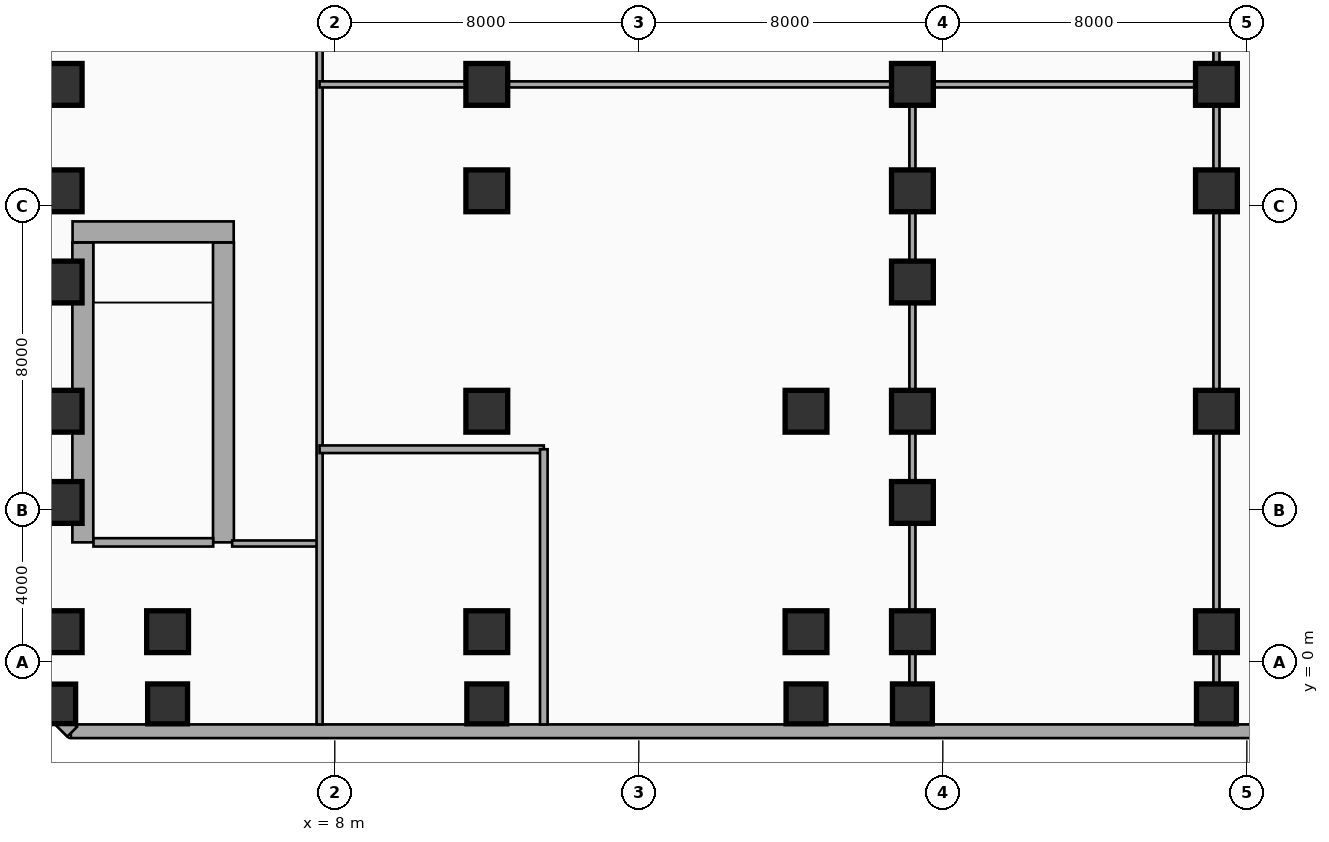
"""IFC4 building model, lengths in metres.
Left out: names, types, materials, properties, quantities, classifications, styles, units other than length and angle.
Written with IfcOpenShell. Run it as: python <this file> out.ifc"""

import sys

from ifc_helpers import new_model, si_unit, direction, frame, frame_2d, origin, origin_2d, place, context, subcontext, project, spatial, rectangle, extrude, element, fill, save


model = new_model("IFC4")
c1 = context("Model", 3, precision=1e-05, world=origin(), true_north=direction((0.0, 1.0)))
c2 = subcontext(c1, "Body", "Model", "MODEL_VIEW")
j1 = project(units=[si_unit("LENGTHUNIT", "METRE"), si_unit("PLANEANGLEUNIT", "RADIAN")], contexts=[c1])
p1 = place(None, origin())
s1 = spatial("IfcSite", under=j1, at=p1, CompositionType="ELEMENT")
p2 = place(p1, origin())
s2 = spatial("IfcBuilding", under=s1, at=p2, CompositionType="ELEMENT")
p3 = place(p2, origin())
s3 = spatial("IfcBuildingStorey", under=s2, at=p3, CompositionType="ELEMENT", Elevation=0.0)
for number, where, z_axis, x_axis in (
    (1, (1.37, 3.15, 0.0), (0.0, 0.0, 1.0), (0.0, 1.0, 0.0)),
    (2, (5.07, 3.15, 0.0), (0.0, 0.0, 1.0), (0.0, 1.0, 0.0)),
):
    element("IfcWall", number, at=place(p3, frame(where, z_axis=z_axis, x_axis=x_axis)), inside=s3, PredefinedType="SHEAR", context=c2, shape_type="SweptSolid", body=[
        extrude(rectangle(XDim=7.89, YDim=0.55, at=frame_2d((3.945, 0.0))), origin(), (0.0, 0.0, 1.0), 5.94),
    ])
p4 = place(p3, frame((1.1, 11.32, 0.0), z_axis=(0.0, 0.0, 1.0), x_axis=(1.0, 0.0, 0.0)))
e3 = element("IfcWall", 3, at=p4, inside=s3, PredefinedType="SHEAR", context=c2, shape_type="SweptSolid", body=[
    extrude(rectangle(XDim=4.24, YDim=0.55, at=frame_2d((2.12, 0.0))), origin(), (0.0, 0.0, 1.0), 5.94),
])
p5 = place(p3, frame((0.8, -1.1, 0.0), z_axis=(0.0, 0.0, 1.0), x_axis=(1.0, 0.0, 0.0)))
e4 = element("IfcColumn", 4, at=p5, inside=s3, PredefinedType="PILASTER", context=c2, shape_type="SweptSolid", body=[
    extrude(rectangle(XDim=0.76, YDim=1.04, at=origin_2d()), origin(), (0.0, 0.0, 1.0), 5.94),
])
for number, where, z_axis, x_axis in (
    (5, (0.8, 0.8, 0.0), (0.0, 0.0, 1.0), (1.0, 0.0, 0.0)),
    (6, (0.8, 4.2, 0.0), (0.0, 0.0, 1.0), (1.0, 0.0, 0.0)),
    (7, (0.8, 6.6, 0.0), (0.0, 0.0, 1.0), (1.0, 0.0, 0.0)),
    (8, (0.8, 10.0, 0.0), (0.0, 0.0, 1.0), (1.0, 0.0, 0.0)),
    (9, (0.8, 12.4, 0.0), (0.0, 0.0, 1.0), (1.0, 0.0, 0.0)),
    (10, (0.8, 15.2, 0.0), (0.0, 0.0, 1.0), (1.0, 0.0, 0.0)),
):
    element("IfcColumn", number, at=place(p3, frame(where, z_axis=z_axis, x_axis=x_axis)), inside=s3, PredefinedType="COLUMN", context=c2, shape_type="SweptSolid", body=[
        extrude(rectangle(XDim=1.1, YDim=1.1, at=origin_2d()), origin(), (0.0, 0.0, 1.0), 5.94),
    ])
p6 = place(p3, frame((3.6, -1.1, 0.0), z_axis=(0.0, 0.0, 1.0), x_axis=(1.0, 0.0, 0.0)))
e11 = element("IfcColumn", 11, at=p6, inside=s3, PredefinedType="COLUMN", context=c2, shape_type="SweptSolid", body=[
    extrude(rectangle(XDim=1.05, YDim=1.05, at=origin_2d()), origin(), (0.0, 0.0, 1.0), 5.94),
])
p7 = place(p3, frame((3.6, 0.8, 0.0), z_axis=(0.0, 0.0, 1.0), x_axis=(1.0, 0.0, 0.0)))
e12 = element("IfcColumn", 12, at=p7, inside=s3, PredefinedType="COLUMN", context=c2, shape_type="SweptSolid", body=[
    extrude(rectangle(XDim=1.1, YDim=1.1, at=origin_2d()), origin(), (0.0, 0.0, 1.0), 5.94),
])
p8 = place(p3, frame((12.0, -1.1, 0.0), z_axis=(0.0, 0.0, 1.0), x_axis=(1.0, 0.0, 0.0)))
e13 = element("IfcColumn", 13, at=p8, inside=s3, PredefinedType="COLUMN", context=c2, shape_type="SweptSolid", body=[
    extrude(rectangle(XDim=1.05, YDim=1.05, at=origin_2d()), origin(), (0.0, 0.0, 1.0), 5.94),
])
for number, where, z_axis, x_axis in (
    (14, (12.0, 0.8, 0.0), (0.0, 0.0, 1.0), (1.0, 0.0, 0.0)),
    (15, (12.0, 6.6, 0.0), (0.0, 0.0, 1.0), (1.0, 0.0, 0.0)),
    (16, (12.0, 12.4, 0.0), (0.0, 0.0, 1.0), (1.0, 0.0, 0.0)),
    (17, (12.0, 15.2, 0.0), (0.0, 0.0, 1.0), (1.0, 0.0, 0.0)),
):
    element("IfcColumn", number, at=place(p3, frame(where, z_axis=z_axis, x_axis=x_axis)), inside=s3, PredefinedType="COLUMN", context=c2, shape_type="SweptSolid", body=[
        extrude(rectangle(XDim=1.1, YDim=1.1, at=origin_2d()), origin(), (0.0, 0.0, 1.0), 5.94),
    ])
p9 = place(p3, frame((20.4, -1.1, 0.0), z_axis=(0.0, 0.0, 1.0), x_axis=(1.0, 0.0, 0.0)))
e18 = element("IfcColumn", 18, at=p9, inside=s3, PredefinedType="COLUMN", context=c2, shape_type="SweptSolid", body=[
    extrude(rectangle(XDim=1.05, YDim=1.05, at=origin_2d()), origin(), (0.0, 0.0, 1.0), 5.94),
])
for number, where, z_axis, x_axis in (
    (19, (20.4, 0.8, 0.0), (0.0, 0.0, 1.0), (1.0, 0.0, 0.0)),
    (20, (20.4, 6.6, 0.0), (0.0, 0.0, 1.0), (1.0, 0.0, 0.0)),
):
    element("IfcColumn", number, at=place(p3, frame(where, z_axis=z_axis, x_axis=x_axis)), inside=s3, PredefinedType="COLUMN", context=c2, shape_type="SweptSolid", body=[
        extrude(rectangle(XDim=1.1, YDim=1.1, at=origin_2d()), origin(), (0.0, 0.0, 1.0), 5.94),
    ])
p10 = place(p3, frame((23.2, -1.1, 0.0), z_axis=(0.0, 0.0, 1.0), x_axis=(1.0, 0.0, 0.0)))
e21 = element("IfcColumn", 21, at=p10, inside=s3, PredefinedType="COLUMN", context=c2, shape_type="SweptSolid", body=[
    extrude(rectangle(XDim=1.05, YDim=1.05, at=origin_2d()), origin(), (0.0, 0.0, 1.0), 5.94),
])
for number, where, z_axis, x_axis in (
    (22, (23.2, 0.8, 0.0), (0.0, 0.0, 1.0), (1.0, 0.0, 0.0)),
    (23, (23.2, 4.2, 0.0), (0.0, 0.0, 1.0), (1.0, 0.0, 0.0)),
    (24, (23.2, 6.6, 0.0), (0.0, 0.0, 1.0), (1.0, 0.0, 0.0)),
    (25, (23.2, 10.0, 0.0), (0.0, 0.0, 1.0), (1.0, 0.0, 0.0)),
    (26, (23.2, 12.4, 0.0), (0.0, 0.0, 1.0), (1.0, 0.0, 0.0)),
    (27, (23.2, 15.2, 0.0), (0.0, 0.0, 1.0), (1.0, 0.0, 0.0)),
):
    element("IfcColumn", number, at=place(p3, frame(where, z_axis=z_axis, x_axis=x_axis)), inside=s3, PredefinedType="COLUMN", context=c2, shape_type="SweptSolid", body=[
        extrude(rectangle(XDim=1.1, YDim=1.1, at=origin_2d()), origin(), (0.0, 0.0, 1.0), 5.94),
    ])
p11 = place(p3, frame((31.2, -1.1, 0.0), z_axis=(0.0, 0.0, 1.0), x_axis=(1.0, 0.0, 0.0)))
e28 = element("IfcColumn", 28, at=p11, inside=s3, PredefinedType="COLUMN", context=c2, shape_type="SweptSolid", body=[
    extrude(rectangle(XDim=1.05, YDim=1.05, at=origin_2d()), origin(), (0.0, 0.0, 1.0), 5.94),
])
for number, where, z_axis, x_axis in (
    (29, (31.2, 0.8, 0.0), (0.0, 0.0, 1.0), (1.0, 0.0, 0.0)),
    (30, (31.2, 6.6, 0.0), (0.0, 0.0, 1.0), (1.0, 0.0, 0.0)),
    (31, (31.2, 12.4, 0.0), (0.0, 0.0, 1.0), (1.0, 0.0, 0.0)),
    (32, (31.2, 15.2, 0.0), (0.0, 0.0, 1.0), (1.0, 0.0, 0.0)),
):
    element("IfcColumn", number, at=place(p3, frame(where, z_axis=z_axis, x_axis=x_axis)), inside=s3, PredefinedType="COLUMN", context=c2, shape_type="SweptSolid", body=[
        extrude(rectangle(XDim=1.1, YDim=1.1, at=origin_2d()), origin(), (0.0, 0.0, 1.0), 5.94),
    ])
p12 = place(p3, frame((1.055, -1.82, 0.0), z_axis=(0.0, 0.0, 1.0), x_axis=(1.0, 0.0, 0.0)))
e33 = element("IfcWall", 33, at=p12, inside=s3, PredefinedType="SOLIDWALL", context=c2, shape_type="SweptSolid", body=[
    extrude(rectangle(XDim=31.89, YDim=0.36, at=frame_2d((15.945, 0.0))), origin(), (0.0, 0.0, 1.0), 5.62),
])
p13 = place(p12, frame((5.6, 0.0, 0.0), z_axis=(0.0, 0.0, 1.0), x_axis=(-1.0, 0.0, 0.0)))
e34 = element("IfcOpeningElement", 34, at=p13, cuts=e33, PredefinedType="OPENING", context=c2, shape_type="SweptSolid", body=[
    extrude(rectangle(XDim=1.8, YDim=2.2, at=frame_2d((0.9, 1.1))), frame((0.0, 0.19, 0.0), z_axis=(0.0, -1.0, 0.0), x_axis=(1.0, 0.0, 0.0)), (0.0, 0.0, 1.0), 0.38),
])
p14 = place(p12, frame((7.9, 0.0, 0.0), z_axis=(0.0, 0.0, 1.0), x_axis=(-1.0, 0.0, 0.0)))
e35 = element("IfcOpeningElement", 35, at=p14, cuts=e33, PredefinedType="OPENING", context=c2, shape_type="SweptSolid", body=[
    extrude(rectangle(XDim=1.1, YDim=2.2, at=frame_2d((0.55, 1.1))), frame((0.0, 0.19, 0.0), z_axis=(0.0, -1.0, 0.0), x_axis=(1.0, 0.0, 0.0)), (0.0, 0.0, 1.0), 0.38),
])
p15 = place(p12, frame((16.8, 0.0, 0.0), z_axis=(0.0, 0.0, 1.0), x_axis=(-1.0, 0.0, 0.0)))
e36 = element("IfcOpeningElement", 36, at=p15, cuts=e33, PredefinedType="OPENING", context=c2, shape_type="SweptSolid", body=[
    extrude(rectangle(XDim=1.8, YDim=2.4, at=frame_2d((0.9, 1.2))), frame((0.0, 0.19, 0.0), z_axis=(0.0, -1.0, 0.0), x_axis=(1.0, 0.0, 0.0)), (0.0, 0.0, 1.0), 0.38),
])
p16 = place(p12, frame((25.8, 0.0, 0.0), z_axis=(0.0, 0.0, 1.0), x_axis=(-1.0, 0.0, 0.0)))
e37 = element("IfcOpeningElement", 37, at=p16, cuts=e33, PredefinedType="OPENING", context=c2, shape_type="SweptSolid", body=[
    extrude(rectangle(XDim=1.8, YDim=2.4, at=frame_2d((0.9, 1.2))), frame((0.0, 0.19, 0.0), z_axis=(0.0, -1.0, 0.0), x_axis=(1.0, 0.0, 0.0)), (0.0, 0.0, 1.0), 0.38),
])
p17 = place(p3, frame((-1.834, 1.088, 0.0), z_axis=(0.0, 0.0, 1.0), x_axis=(0.707106781187, -0.707106781187, 0.0)))
e38 = element("IfcWall", 38, at=p17, inside=s3, PredefinedType="SOLIDWALL", context=c2, shape_type="SweptSolid", body=[
    extrude(rectangle(XDim=4.133, YDim=0.36, at=frame_2d((2.066, 0.0))), origin(), (0.0, 0.0, 1.0), 5.62),
])
p18 = place(p3, frame((1.65, 3.15, 0.0), z_axis=(0.0, 0.0, 1.0), x_axis=(1.0, 0.0, 0.0)))
e39 = element("IfcWall", 39, at=p18, inside=s3, PredefinedType="PARTITIONING", context=c2, shape_type="SweptSolid", body=[
    extrude(rectangle(XDim=3.15, YDim=0.22, at=frame_2d((1.575, 0.0))), origin(), (0.0, 0.0, 1.0), 5.62),
])
p19 = place(p18, frame((2.1, 0.0, 0.0), z_axis=(0.0, 0.0, 1.0), x_axis=(-1.0, 0.0, 0.0)))
e40 = element("IfcOpeningElement", 40, at=p19, cuts=e39, PredefinedType="OPENING", context=c2, shape_type="SweptSolid", body=[
    extrude(rectangle(XDim=1.05, YDim=2.15, at=frame_2d((0.525, 1.075))), frame((0.0, 0.12, 0.0), z_axis=(0.0, -1.0, 0.0), x_axis=(1.0, 0.0, 0.0)), (0.0, 0.0, 1.0), 0.24),
])
p20 = place(p3, frame((5.3, 3.12, 0.0), z_axis=(0.0, 0.0, 1.0), x_axis=(1.0, 0.0, 0.0)))
e41 = element("IfcWall", 41, at=p20, inside=s3, PredefinedType="PARTITIONING", context=c2, shape_type="SweptSolid", body=[
    extrude(rectangle(XDim=2.3, YDim=0.16, at=frame_2d((1.15, 0.0))), origin(), (0.0, 0.0, 1.0), 5.62),
])
p21 = place(p20, frame((0.6, 0.0, 0.0)))
e42 = element("IfcOpeningElement", 42, at=p21, cuts=e41, PredefinedType="OPENING", context=c2, shape_type="SweptSolid", body=[
    extrude(rectangle(XDim=1.1, YDim=2.15, at=frame_2d((0.55, 1.075))), frame((0.0, 0.09, 0.0), z_axis=(0.0, -1.0, 0.0), x_axis=(1.0, 0.0, 0.0)), (0.0, 0.0, 1.0), 0.18),
])
p22 = place(p3, frame((7.6, -1.64, 0.0), z_axis=(0.0, 0.0, 1.0), x_axis=(0.0, 1.0, 0.0)))
e43 = element("IfcWall", 43, at=p22, inside=s3, PredefinedType="PARTITIONING", context=c2, shape_type="SweptSolid", body=[
    extrude(rectangle(XDim=31.04, YDim=0.16, at=frame_2d((15.52, 0.0))), origin(), (0.0, 0.0, 1.0), 5.62),
])
p23 = place(p22, frame((1.8, 0.0, 0.0)))
e44 = element("IfcOpeningElement", 44, at=p23, cuts=e43, PredefinedType="OPENING", context=c2, shape_type="SweptSolid", body=[
    extrude(rectangle(XDim=1.1, YDim=2.15, at=frame_2d((0.55, 1.075))), frame((0.0, 0.09, 0.0), z_axis=(0.0, -1.0, 0.0), x_axis=(1.0, 0.0, 0.0)), (0.0, 0.0, 1.0), 0.18),
])
p24 = place(p3, frame((7.6, 5.6, 0.0), z_axis=(0.0, 0.0, 1.0), x_axis=(1.0, 0.0, 0.0)))
e45 = element("IfcWall", 45, at=p24, inside=s3, PredefinedType="PARTITIONING", context=c2, shape_type="SweptSolid", body=[
    extrude(rectangle(XDim=5.9, YDim=0.2, at=frame_2d((2.95, 0.0))), origin(), (0.0, 0.0, 1.0), 5.62),
])
p25 = place(p3, frame((13.5, -1.64, 0.0), z_axis=(0.0, 0.0, 1.0), x_axis=(0.0, 1.0, 0.0)))
e46 = element("IfcWall", 46, at=p25, inside=s3, PredefinedType="PARTITIONING", context=c2, shape_type="SweptSolid", body=[
    extrude(rectangle(XDim=7.24, YDim=0.2, at=frame_2d((3.62, 0.0))), origin(), (0.0, 0.0, 1.0), 5.62),
])
p26 = place(p3, frame((7.6, 15.2, 0.0), z_axis=(0.0, 0.0, 1.0), x_axis=(1.0, 0.0, 0.0)))
e47 = element("IfcWall", 47, at=p26, inside=s3, PredefinedType="PARTITIONING", context=c2, shape_type="SweptSolid", body=[
    extrude(rectangle(XDim=23.6, YDim=0.16, at=frame_2d((11.8, 0.0))), origin(), (0.0, 0.0, 1.0), 4.805),
])
p27 = place(p26, frame((6.0, 0.0, 0.0)))
e48 = element("IfcOpeningElement", 48, at=p27, cuts=e47, PredefinedType="OPENING", context=c2, shape_type="SweptSolid", body=[
    extrude(rectangle(XDim=0.95, YDim=2.15, at=frame_2d((0.475, 1.075))), frame((0.0, 0.09, 0.0), z_axis=(0.0, -1.0, 0.0), x_axis=(1.0, 0.0, 0.0)), (0.0, 0.0, 1.0), 0.18),
])
p28 = place(p26, frame((18.5, 0.0, 0.0)))
e49 = element("IfcOpeningElement", 49, at=p28, cuts=e47, PredefinedType="OPENING", context=c2, shape_type="SweptSolid", body=[
    extrude(rectangle(XDim=1.8, YDim=2.3, at=frame_2d((0.9, 1.15))), frame((0.0, 0.09, 0.0), z_axis=(0.0, -1.0, 0.0), x_axis=(1.0, 0.0, 0.0)), (0.0, 0.0, 1.0), 0.18),
])
p29 = place(p3, frame((23.2, -1.64, 0.0), z_axis=(0.0, 0.0, 1.0), x_axis=(0.0, 1.0, 0.0)))
e50 = element("IfcWall", 50, at=p29, inside=s3, PredefinedType="PARTITIONING", context=c2, shape_type="SweptSolid", body=[
    extrude(rectangle(XDim=16.84, YDim=0.16, at=frame_2d((8.42, 0.0))), origin(), (0.0, 0.0, 1.0), 4.955),
])
p30 = place(p3, frame((31.2, -1.64, 0.0), z_axis=(0.0, 0.0, 1.0), x_axis=(0.0, 1.0, 0.0)))
e51 = element("IfcWall", 51, at=p30, inside=s3, PredefinedType="PARTITIONING", context=c2, shape_type="SweptSolid", body=[
    extrude(rectangle(XDim=31.04, YDim=0.16, at=frame_2d((15.52, 0.0))), origin(), (0.0, 0.0, 1.0), 4.805),
])
p31 = place(p13, origin())
e52 = element("IfcDoor", 52, at=p31, inside=s3, OperationType="DOUBLE_DOOR_SINGLE_SWING", PredefinedType="DOOR", context=c2, shape_type="SweptSolid", body=[
    extrude(rectangle(XDim=1.8, YDim=2.2, at=frame_2d((0.9, 1.1))), frame((0.0, 0.025, 0.0), z_axis=(0.0, -1.0, 0.0), x_axis=(1.0, 0.0, 0.0)), (0.0, 0.0, 1.0), 0.05),
])
fill(e34, e52)
p32 = place(p14, origin())
e53 = element("IfcDoor", 53, at=p32, inside=s3, OperationType="SINGLE_SWING_LEFT", PredefinedType="DOOR", context=c2, shape_type="SweptSolid", body=[
    extrude(rectangle(XDim=1.1, YDim=2.2, at=frame_2d((0.55, 1.1))), frame((0.0, 0.025, 0.0), z_axis=(0.0, -1.0, 0.0), x_axis=(1.0, 0.0, 0.0)), (0.0, 0.0, 1.0), 0.05),
])
fill(e35, e53)
p33 = place(p15, origin())
e54 = element("IfcDoor", 54, at=p33, inside=s3, OperationType="DOUBLE_DOOR_SINGLE_SWING", PredefinedType="DOOR", context=c2, shape_type="SweptSolid", body=[
    extrude(rectangle(XDim=1.8, YDim=2.4, at=frame_2d((0.9, 1.2))), frame((0.0, 0.025, 0.0), z_axis=(0.0, -1.0, 0.0), x_axis=(1.0, 0.0, 0.0)), (0.0, 0.0, 1.0), 0.05),
])
fill(e36, e54)
p34 = place(p16, origin())
e55 = element("IfcDoor", 55, at=p34, inside=s3, OperationType="DOUBLE_DOOR_SINGLE_SWING", PredefinedType="DOOR", context=c2, shape_type="SweptSolid", body=[
    extrude(rectangle(XDim=1.8, YDim=2.4, at=frame_2d((0.9, 1.2))), frame((0.0, 0.025, 0.0), z_axis=(0.0, -1.0, 0.0), x_axis=(1.0, 0.0, 0.0)), (0.0, 0.0, 1.0), 0.05),
])
fill(e37, e55)
p35 = place(p19, origin())
e56 = element("IfcDoor", 56, at=p35, inside=s3, OperationType="SINGLE_SWING_LEFT", PredefinedType="DOOR", context=c2, shape_type="SweptSolid", body=[
    extrude(rectangle(XDim=1.05, YDim=2.15, at=frame_2d((0.525, 1.075))), frame((0.0, 0.025, 0.0), z_axis=(0.0, -1.0, 0.0), x_axis=(1.0, 0.0, 0.0)), (0.0, 0.0, 1.0), 0.05),
])
fill(e40, e56)
p36 = place(p21, origin())
e57 = element("IfcDoor", 57, at=p36, inside=s3, OperationType="SINGLE_SWING_LEFT", PredefinedType="DOOR", context=c2, shape_type="SweptSolid", body=[
    extrude(rectangle(XDim=1.1, YDim=2.15, at=frame_2d((0.55, 1.075))), frame((0.0, 0.025, 0.0), z_axis=(0.0, -1.0, 0.0), x_axis=(1.0, 0.0, 0.0)), (0.0, 0.0, 1.0), 0.05),
])
fill(e42, e57)
p37 = place(p23, origin())
e58 = element("IfcDoor", 58, at=p37, inside=s3, OperationType="SINGLE_SWING_RIGHT", PredefinedType="DOOR", context=c2, shape_type="SweptSolid", body=[
    extrude(rectangle(XDim=1.1, YDim=2.15, at=frame_2d((0.55, 1.075))), frame((0.0, 0.025, 0.0), z_axis=(0.0, -1.0, 0.0), x_axis=(1.0, 0.0, 0.0)), (0.0, 0.0, 1.0), 0.05),
])
fill(e44, e58)
p38 = place(p27, origin())
e59 = element("IfcDoor", 59, at=p38, inside=s3, OperationType="SINGLE_SWING_LEFT", PredefinedType="DOOR", context=c2, shape_type="SweptSolid", body=[
    extrude(rectangle(XDim=0.95, YDim=2.15, at=frame_2d((0.475, 1.075))), frame((0.0, 0.025, 0.0), z_axis=(0.0, -1.0, 0.0), x_axis=(1.0, 0.0, 0.0)), (0.0, 0.0, 1.0), 0.05),
])
fill(e48, e59)
p39 = place(p28, origin())
e60 = element("IfcDoor", 60, at=p39, inside=s3, OperationType="SINGLE_SWING_RIGHT", PredefinedType="DOOR", context=c2, shape_type="SweptSolid", body=[
    extrude(rectangle(XDim=1.8, YDim=2.3, at=frame_2d((0.9, 1.15))), frame((0.0, 0.025, 0.0), z_axis=(0.0, -1.0, 0.0), x_axis=(1.0, 0.0, 0.0)), (0.0, 0.0, 1.0), 0.05),
])
fill(e49, e60)
save(model, sys.argv[1])
